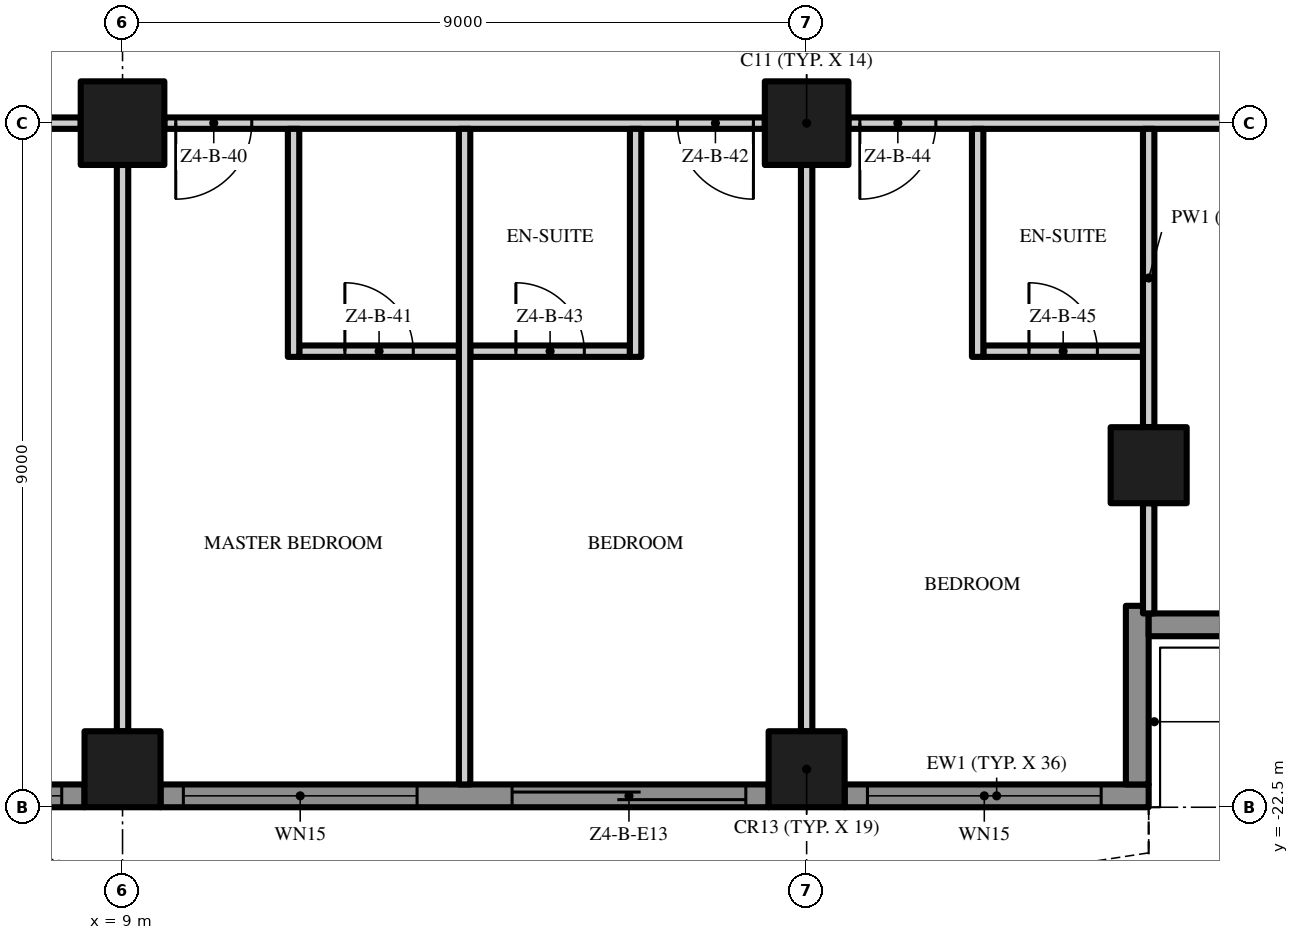
"""IFC4 building model, lengths in metres.
Left out: names, types, materials, properties, quantities, classifications, styles, units other than length and angle.
Written with IfcOpenShell. Run it as: python <this file> out.ifc"""

import sys

from ifc_helpers import new_model, si_unit, direction, frame, frame_2d, origin, origin_2d, place, context, subcontext, project, spatial, polyline, rectangle, outline, extrude, element, fill, save


model = new_model("IFC4")
c1 = context("Model", 3, precision=1e-05, world=origin(), true_north=direction((0.0, 1.0)))
c2 = subcontext(c1, "Body", "Model", "MODEL_VIEW")
j1 = project(units=[si_unit("LENGTHUNIT", "METRE"), si_unit("PLANEANGLEUNIT", "RADIAN")], contexts=[c1])
p1 = place(None, origin())
s1 = spatial("IfcSite", under=j1, at=p1, CompositionType="ELEMENT")
p2 = place(p1, origin())
s2 = spatial("IfcBuilding", under=s1, at=p2, CompositionType="ELEMENT")
p3 = place(p2, frame((0.0, 0.0, 203.4)))
s3 = spatial("IfcBuildingStorey", under=s2, at=p3, CompositionType="ELEMENT", Elevation=203.4)
p4 = place(p3, frame((18.0, -13.5, 0.0), z_axis=(0.0, 0.0, 1.0), x_axis=(1.0, 0.0, 0.0)))
e1 = element("IfcColumn", 1, at=p4, inside=s3, PredefinedType="COLUMN", context=c2, shape_type="SweptSolid", body=[
    extrude(rectangle(XDim=1.1, YDim=1.1, at=origin_2d()), origin(), (0.0, 0.0, 1.0), 3.5),
])
for number, where, z_axis, x_axis in (
    (2, (18.0, -22.0, 0.0), (0.0, 0.0, 1.0), (1.0, 0.0, 0.0)),
    (3, (22.5, -18.0, 0.0), (0.0, 0.0, 1.0), (1.0, 0.0, 0.0)),
):
    element("IfcColumn", number, at=place(p3, frame(where, z_axis=z_axis, x_axis=x_axis)), inside=s3, PredefinedType="COLUMN", context=c2, shape_type="SweptSolid", body=[
        extrude(rectangle(XDim=1.0, YDim=1.0, at=origin_2d()), origin(), (0.0, 0.0, 1.0), 3.5),
    ])
p5 = place(p3, frame((9.0, -13.5, 0.0), z_axis=(0.0, 0.0, 1.0), x_axis=(1.0, 0.0, 0.0)))
e4 = element("IfcColumn", 4, at=p5, inside=s3, PredefinedType="COLUMN", context=c2, shape_type="SweptSolid", body=[
    extrude(rectangle(XDim=1.1, YDim=1.1, at=origin_2d()), origin(), (0.0, 0.0, 1.0), 3.5),
])
p6 = place(p3, frame((9.0, -22.0, 0.0), z_axis=(0.0, 0.0, 1.0), x_axis=(1.0, 0.0, 0.0)))
e5 = element("IfcColumn", 5, at=p6, inside=s3, PredefinedType="COLUMN", context=c2, shape_type="SweptSolid", body=[
    extrude(rectangle(XDim=1.0, YDim=1.0, at=origin_2d()), origin(), (0.0, 0.0, 1.0), 3.5),
])
p7 = place(p3, frame((8.5, -22.35, 0.0), z_axis=(0.0, 0.0, 1.0), x_axis=(-1.0, 0.0, 0.0)))
e6 = element("IfcWall", 6, at=p7, inside=s3, PredefinedType="SOLIDWALL", context=c2, shape_type="SweptSolid", body=[
    extrude(rectangle(XDim=8.0, YDim=0.3, at=frame_2d((4.0, 0.0))), origin(), (0.0, 0.0, 1.0), 3.5),
])
p8 = place(p7, frame((4.625, 0.0, 0.0)))
e7 = element("IfcOpeningElement", 7, at=p8, cuts=e6, PredefinedType="OPENING", context=c2, shape_type="SweptSolid", body=[
    extrude(rectangle(XDim=3.075, YDim=2.4, at=frame_2d((1.538, 1.2))), frame((0.0, 0.16, 0.0), z_axis=(0.0, -1.0, 0.0), x_axis=(1.0, 0.0, 0.0)), (0.0, 0.0, 1.0), 0.32),
])
p9 = place(p7, frame((0.3, 0.0, 0.45)))
e8 = element("IfcOpeningElement", 8, at=p9, cuts=e6, PredefinedType="OPENING", context=c2, shape_type="SweptSolid", body=[
    extrude(rectangle(XDim=3.075, YDim=2.65, at=frame_2d((1.538, 1.325))), frame((0.0, 0.16, 0.0), z_axis=(0.0, -1.0, 0.0), x_axis=(1.0, 0.0, 0.0)), (0.0, 0.0, 1.0), 0.32),
])
p10 = place(p3, frame((17.5, -22.35, 0.0), z_axis=(0.0, 0.0, 1.0), x_axis=(-1.0, 0.0, 0.0)))
e9 = element("IfcWall", 9, at=p10, inside=s3, PredefinedType="SOLIDWALL", context=c2, shape_type="SweptSolid", body=[
    extrude(rectangle(XDim=8.0, YDim=0.3, at=frame_2d((4.0, 0.0))), origin(), (0.0, 0.0, 1.0), 3.5),
])
p11 = place(p10, frame((4.625, 0.0, 0.45)))
e10 = element("IfcOpeningElement", 10, at=p11, cuts=e9, PredefinedType="OPENING", context=c2, shape_type="SweptSolid", body=[
    extrude(rectangle(XDim=3.075, YDim=2.65, at=frame_2d((1.538, 1.325))), frame((0.0, 0.16, 0.0), z_axis=(0.0, -1.0, 0.0), x_axis=(1.0, 0.0, 0.0)), (0.0, 0.0, 1.0), 0.32),
])
p12 = place(p10, frame((0.3, 0.0, 0.0)))
e11 = element("IfcOpeningElement", 11, at=p12, cuts=e9, PredefinedType="OPENING", context=c2, shape_type="SweptSolid", body=[
    extrude(rectangle(XDim=3.075, YDim=2.4, at=frame_2d((1.538, 1.2))), frame((0.0, 0.16, 0.0), z_axis=(0.0, -1.0, 0.0), x_axis=(1.0, 0.0, 0.0)), (0.0, 0.0, 1.0), 0.32),
])
p13 = place(p3, frame((22.5, -22.35, 0.0), z_axis=(0.0, 0.0, 1.0), x_axis=(-1.0, 0.0, 0.0)))
e12 = element("IfcWall", 12, at=p13, inside=s3, PredefinedType="SOLIDWALL", context=c2, shape_type="SweptSolid", body=[
    extrude(rectangle(XDim=4.0, YDim=0.3, at=frame_2d((2.0, 0.0))), origin(), (0.0, 0.0, 1.0), 3.5),
])
p14 = place(p13, frame((0.625, 0.0, 0.45)))
e13 = element("IfcOpeningElement", 13, at=p14, cuts=e12, PredefinedType="OPENING", context=c2, shape_type="SweptSolid", body=[
    extrude(rectangle(XDim=3.075, YDim=2.65, at=frame_2d((1.538, 1.325))), frame((0.0, 0.16, 0.0), z_axis=(0.0, -1.0, 0.0), x_axis=(1.0, 0.0, 0.0)), (0.0, 0.0, 1.0), 0.32),
])
p15 = place(p3, frame((22.35, -19.85, 0.0), z_axis=(0.0, 0.0, 1.0), x_axis=(0.0, -1.0, 0.0)))
e14 = element("IfcWall", 14, at=p15, inside=s3, PredefinedType="SOLIDWALL", context=c2, shape_type="SweptSolid", body=[
    extrude(rectangle(XDim=2.35, YDim=0.3, at=frame_2d((1.175, 0.0))), origin(), (0.0, 0.0, 1.0), 3.5),
])
p16 = place(p3, frame((24.75, -20.1, 0.0), z_axis=(0.0, 0.0, 1.0), x_axis=(-1.0, 0.0, 0.0)))
e15 = element("IfcWall", 15, at=p16, inside=s3, PredefinedType="SOLIDWALL", context=c2, shape_type="SweptSolid", body=[
    extrude(rectangle(XDim=2.25, YDim=0.3, at=frame_2d((1.125, 0.0))), origin(), (0.0, 0.0, 1.0), 3.5),
])
p17 = place(p3, origin())
e16 = element("IfcWall", 16, at=p17, inside=s3, PredefinedType="USERDEFINED", context=c2, shape_type="SweptSolid", body=[
    extrude(outline(polyline([(-22.5, -23.1), (-21.0, -23.329), (-19.5, -23.929), (-18.0, -24.671), (-16.5, -25.271), (-15.0, -25.5), (-13.5, -25.271), (-12.0, -24.671), (-10.5, -23.929), (-9.0, -23.329), (-7.5, -23.1), (-6.0, -23.329), (-4.5, -23.929), (-3.0, -24.671), (-1.5, -25.271), (0.0, -25.5), (1.5, -25.271), (3.0, -24.671), (4.5, -23.929), (6.0, -23.329), (7.5, -23.1), (9.0, -23.329), (10.5, -23.929), (12.0, -24.671), (13.5, -25.271), (15.0, -25.5), (16.5, -25.271), (18.0, -24.671), (19.5, -23.929), (21.0, -23.329), (22.5, -23.1), (22.462, -22.853), (20.934, -23.086), (19.398, -23.701), (17.898, -24.442), (16.434, -25.028), (15.0, -25.247), (13.566, -25.028), (12.102, -24.442), (10.602, -23.701), (9.066, -23.086), (7.5, -22.847), (5.934, -23.086), (4.398, -23.701), (2.898, -24.442), (1.434, -25.028), (0.0, -25.247), (-1.434, -25.028), (-2.898, -24.442), (-4.398, -23.701), (-5.934, -23.086), (-7.5, -22.847), (-9.066, -23.086), (-10.602, -23.701), (-12.102, -24.442), (-13.566, -25.028), (-15.0, -25.247), (-16.434, -25.028), (-17.898, -24.442), (-19.398, -23.701), (-20.934, -23.086), (-22.462, -22.853), (-22.5, -23.1)])), origin(), (0.0, 0.0, 1.0), 0.9),
])
p18 = place(p3, frame((11.325, -16.5, 0.0), z_axis=(0.0, 0.0, 1.0), x_axis=(1.0, 0.0, 0.0)))
e17 = element("IfcWall", 17, at=p18, inside=s3, PredefinedType="PARTITIONING", context=c2, shape_type="SweptSolid", body=[
    extrude(rectangle(XDim=2.1, YDim=0.15, at=frame_2d((1.05, 0.0))), origin(), (0.0, 0.0, 1.0), 3.5),
])
p19 = place(p18, frame((0.6, 0.0, 0.0)))
e18 = element("IfcOpeningElement", 18, at=p19, cuts=e17, PredefinedType="OPENING", context=c2, shape_type="SweptSolid", body=[
    extrude(rectangle(XDim=0.9, YDim=2.1, at=frame_2d((0.45, 1.05))), frame((0.0, 0.085, 0.0), z_axis=(0.0, -1.0, 0.0), x_axis=(1.0, 0.0, 0.0)), (0.0, 0.0, 1.0), 0.17),
])
p20 = place(p3, frame((13.575, -16.5, 0.0), z_axis=(0.0, 0.0, 1.0), x_axis=(1.0, 0.0, 0.0)))
e19 = element("IfcWall", 19, at=p20, inside=s3, PredefinedType="PARTITIONING", context=c2, shape_type="SweptSolid", body=[
    extrude(rectangle(XDim=2.1, YDim=0.15, at=frame_2d((1.05, 0.0))), origin(), (0.0, 0.0, 1.0), 3.5),
])
p21 = place(p20, frame((0.6, 0.0, 0.0)))
e20 = element("IfcOpeningElement", 20, at=p21, cuts=e19, PredefinedType="OPENING", context=c2, shape_type="SweptSolid", body=[
    extrude(rectangle(XDim=0.9, YDim=2.1, at=frame_2d((0.45, 1.05))), frame((0.0, 0.085, 0.0), z_axis=(0.0, -1.0, 0.0), x_axis=(1.0, 0.0, 0.0)), (0.0, 0.0, 1.0), 0.17),
])
p22 = place(p3, frame((20.325, -16.5, 0.0), z_axis=(0.0, 0.0, 1.0), x_axis=(1.0, 0.0, 0.0)))
e21 = element("IfcWall", 21, at=p22, inside=s3, PredefinedType="PARTITIONING", context=c2, shape_type="SweptSolid", body=[
    extrude(rectangle(XDim=2.1, YDim=0.15, at=frame_2d((1.05, 0.0))), origin(), (0.0, 0.0, 1.0), 3.5),
])
p23 = place(p22, frame((0.6, 0.0, 0.0)))
e22 = element("IfcOpeningElement", 22, at=p23, cuts=e21, PredefinedType="OPENING", context=c2, shape_type="SweptSolid", body=[
    extrude(rectangle(XDim=0.9, YDim=2.1, at=frame_2d((0.45, 1.05))), frame((0.0, 0.085, 0.0), z_axis=(0.0, -1.0, 0.0), x_axis=(1.0, 0.0, 0.0)), (0.0, 0.0, 1.0), 0.17),
])
p24 = place(p3, frame((8.45, -13.5, 0.0), z_axis=(0.0, 0.0, 1.0), x_axis=(-1.0, 0.0, 0.0)))
e23 = element("IfcWall", 23, at=p24, inside=s3, PredefinedType="PARTITIONING", context=c2, shape_type="SweptSolid", body=[
    extrude(rectangle(XDim=7.9, YDim=0.15, at=frame_2d((3.95, 0.0))), origin(), (0.0, 0.0, 1.0), 3.5),
])
p25 = place(p24, frame((1.95, 0.0, 0.0)))
e24 = element("IfcOpeningElement", 24, at=p25, cuts=e23, PredefinedType="OPENING", context=c2, shape_type="SweptSolid", body=[
    extrude(rectangle(XDim=1.8, YDim=2.4, at=frame_2d((0.9, 1.2))), frame((0.0, 0.085, 0.0), z_axis=(0.0, -1.0, 0.0), x_axis=(1.0, 0.0, 0.0)), (0.0, 0.0, 1.0), 0.17),
])
p26 = place(p3, frame((17.45, -13.5, 0.0), z_axis=(0.0, 0.0, 1.0), x_axis=(-1.0, 0.0, 0.0)))
e25 = element("IfcWall", 25, at=p26, inside=s3, PredefinedType="PARTITIONING", context=c2, shape_type="SweptSolid", body=[
    extrude(rectangle(XDim=7.9, YDim=0.15, at=frame_2d((3.95, 0.0))), origin(), (0.0, 0.0, 1.0), 3.5),
])
p27 = place(p26, frame((6.75, 0.0, 0.0)))
e26 = element("IfcOpeningElement", 26, at=p27, cuts=e25, PredefinedType="OPENING", context=c2, shape_type="SweptSolid", body=[
    extrude(rectangle(XDim=1.0, YDim=2.4, at=frame_2d((0.5, 1.2))), frame((0.0, 0.085, 0.0), z_axis=(0.0, -1.0, 0.0), x_axis=(1.0, 0.0, 0.0)), (0.0, 0.0, 1.0), 0.17),
])
p28 = place(p26, frame((0.15, 0.0, 0.0)))
e27 = element("IfcOpeningElement", 27, at=p28, cuts=e25, PredefinedType="OPENING", context=c2, shape_type="SweptSolid", body=[
    extrude(rectangle(XDim=1.0, YDim=2.4, at=frame_2d((0.5, 1.2))), frame((0.0, 0.085, 0.0), z_axis=(0.0, -1.0, 0.0), x_axis=(1.0, 0.0, 0.0)), (0.0, 0.0, 1.0), 0.17),
])
p29 = place(p3, frame((26.0, -13.5, 0.0), z_axis=(0.0, 0.0, 1.0), x_axis=(-1.0, 0.0, 0.0)))
e28 = element("IfcWall", 28, at=p29, inside=s3, PredefinedType="PARTITIONING", context=c2, shape_type="SweptSolid", body=[
    extrude(rectangle(XDim=7.45, YDim=0.15, at=frame_2d((3.725, 0.0))), origin(), (0.0, 0.0, 1.0), 3.5),
])
p30 = place(p29, frame((6.3, 0.0, 0.0)))
e29 = element("IfcOpeningElement", 29, at=p30, cuts=e28, PredefinedType="OPENING", context=c2, shape_type="SweptSolid", body=[
    extrude(rectangle(XDim=1.0, YDim=2.4, at=frame_2d((0.5, 1.2))), frame((0.0, 0.085, 0.0), z_axis=(0.0, -1.0, 0.0), x_axis=(1.0, 0.0, 0.0)), (0.0, 0.0, 1.0), 0.17),
])
p31 = place(p29, frame((0.75, 0.0, 0.0)))
e30 = element("IfcOpeningElement", 30, at=p31, cuts=e28, PredefinedType="OPENING", context=c2, shape_type="SweptSolid", body=[
    extrude(rectangle(XDim=1.0, YDim=2.4, at=frame_2d((0.5, 1.2))), frame((0.0, 0.085, 0.0), z_axis=(0.0, -1.0, 0.0), x_axis=(1.0, 0.0, 0.0)), (0.0, 0.0, 1.0), 0.17),
])
p32 = place(p3, frame((9.0, -21.5, 0.0), z_axis=(0.0, 0.0, 1.0), x_axis=(0.0, 1.0, 0.0)))
e31 = element("IfcWall", 31, at=p32, inside=s3, PredefinedType="PARTITIONING", context=c2, shape_type="SweptSolid", body=[
    extrude(rectangle(XDim=7.45, YDim=0.15, at=frame_2d((3.725, 0.0))), origin(), (0.0, 0.0, 1.0), 3.5),
])
p33 = place(p3, frame((11.25, -16.575, 0.0), z_axis=(0.0, 0.0, 1.0), x_axis=(0.0, 1.0, 0.0)))
e32 = element("IfcWall", 32, at=p33, inside=s3, PredefinedType="PARTITIONING", context=c2, shape_type="SweptSolid", body=[
    extrude(rectangle(XDim=3.0, YDim=0.15, at=frame_2d((1.5, 0.0))), origin(), (0.0, 0.0, 1.0), 3.5),
])
p34 = place(p3, frame((13.5, -22.2, 0.0), z_axis=(0.0, 0.0, 1.0), x_axis=(0.0, 1.0, 0.0)))
e33 = element("IfcWall", 33, at=p34, inside=s3, PredefinedType="PARTITIONING", context=c2, shape_type="SweptSolid", body=[
    extrude(rectangle(XDim=8.625, YDim=0.15, at=frame_2d((4.312, 0.0))), origin(), (0.0, 0.0, 1.0), 3.5),
])
p35 = place(p3, frame((15.75, -16.575, 0.0), z_axis=(0.0, 0.0, 1.0), x_axis=(0.0, 1.0, 0.0)))
e34 = element("IfcWall", 34, at=p35, inside=s3, PredefinedType="PARTITIONING", context=c2, shape_type="SweptSolid", body=[
    extrude(rectangle(XDim=3.0, YDim=0.15, at=frame_2d((1.5, 0.0))), origin(), (0.0, 0.0, 1.0), 3.5),
])
p36 = place(p3, frame((18.0, -21.5, 0.0), z_axis=(0.0, 0.0, 1.0), x_axis=(0.0, 1.0, 0.0)))
e35 = element("IfcWall", 35, at=p36, inside=s3, PredefinedType="PARTITIONING", context=c2, shape_type="SweptSolid", body=[
    extrude(rectangle(XDim=7.45, YDim=0.15, at=frame_2d((3.725, 0.0))), origin(), (0.0, 0.0, 1.0), 3.5),
])
p37 = place(p3, frame((20.25, -16.575, 0.0), z_axis=(0.0, 0.0, 1.0), x_axis=(0.0, 1.0, 0.0)))
e36 = element("IfcWall", 36, at=p37, inside=s3, PredefinedType="PARTITIONING", context=c2, shape_type="SweptSolid", body=[
    extrude(rectangle(XDim=3.0, YDim=0.15, at=frame_2d((1.5, 0.0))), origin(), (0.0, 0.0, 1.0), 3.5),
])
p38 = place(p3, frame((22.5, -19.95, 0.0), z_axis=(0.0, 0.0, 1.0), x_axis=(0.0, 1.0, 0.0)))
e37 = element("IfcWall", 37, at=p38, inside=s3, PredefinedType="PARTITIONING", context=c2, shape_type="SweptSolid", body=[
    extrude(rectangle(XDim=1.45, YDim=0.15, at=frame_2d((0.725, 0.0))), origin(), (0.0, 0.0, 1.0), 3.5),
])
p39 = place(p3, frame((22.5, -17.5, 0.0), z_axis=(0.0, 0.0, 1.0), x_axis=(0.0, 1.0, 0.0)))
e38 = element("IfcWall", 38, at=p39, inside=s3, PredefinedType="PARTITIONING", context=c2, shape_type="SweptSolid", body=[
    extrude(rectangle(XDim=3.925, YDim=0.15, at=frame_2d((1.962, 0.0))), origin(), (0.0, 0.0, 1.0), 3.5),
])
p40 = place(p9, origin())
e39 = element("IfcWindow", 39, at=p40, inside=s3, PartitioningType="SINGLE_PANEL", PredefinedType="WINDOW", context=c2, shape_type="SweptSolid", body=[
    extrude(rectangle(XDim=3.075, YDim=2.65, at=frame_2d((1.538, 1.325))), frame((0.0, 0.03, 0.0), z_axis=(0.0, -1.0, 0.0), x_axis=(1.0, 0.0, 0.0)), (0.0, 0.0, 1.0), 0.06),
])
fill(e8, e39)
p41 = place(p11, origin())
e40 = element("IfcWindow", 40, at=p41, inside=s3, PartitioningType="SINGLE_PANEL", PredefinedType="WINDOW", context=c2, shape_type="SweptSolid", body=[
    extrude(rectangle(XDim=3.075, YDim=2.65, at=frame_2d((1.538, 1.325))), frame((0.0, 0.03, 0.0), z_axis=(0.0, -1.0, 0.0), x_axis=(1.0, 0.0, 0.0)), (0.0, 0.0, 1.0), 0.06),
])
fill(e10, e40)
p42 = place(p12, origin())
e41 = element("IfcDoor", 41, at=p42, inside=s3, OperationType="SINGLE_SWING_LEFT", PredefinedType="DOOR", context=c2, shape_type="SweptSolid", body=[
    extrude(rectangle(XDim=3.075, YDim=2.4, at=frame_2d((1.538, 1.2))), frame((0.0, 0.025, 0.0), z_axis=(0.0, -1.0, 0.0), x_axis=(1.0, 0.0, 0.0)), (0.0, 0.0, 1.0), 0.05),
])
fill(e11, e41)
p43 = place(p14, origin())
e42 = element("IfcWindow", 42, at=p43, inside=s3, PartitioningType="SINGLE_PANEL", PredefinedType="WINDOW", context=c2, shape_type="SweptSolid", body=[
    extrude(rectangle(XDim=3.075, YDim=2.65, at=frame_2d((1.538, 1.325))), frame((0.0, 0.03, 0.0), z_axis=(0.0, -1.0, 0.0), x_axis=(1.0, 0.0, 0.0)), (0.0, 0.0, 1.0), 0.06),
])
fill(e13, e42)
p44 = place(p27, origin())
e43 = element("IfcDoor", 43, at=p44, inside=s3, OperationType="SINGLE_SWING_RIGHT", PredefinedType="DOOR", context=c2, shape_type="SweptSolid", body=[
    extrude(rectangle(XDim=1.0, YDim=2.4, at=frame_2d((0.5, 1.2))), frame((0.0, 0.025, 0.0), z_axis=(0.0, -1.0, 0.0), x_axis=(1.0, 0.0, 0.0)), (0.0, 0.0, 1.0), 0.05),
])
fill(e26, e43)
p45 = place(p19, origin())
e44 = element("IfcDoor", 44, at=p45, inside=s3, OperationType="SINGLE_SWING_LEFT", PredefinedType="DOOR", context=c2, shape_type="SweptSolid", body=[
    extrude(rectangle(XDim=0.9, YDim=2.1, at=frame_2d((0.45, 1.05))), frame((0.0, 0.025, 0.0), z_axis=(0.0, -1.0, 0.0), x_axis=(1.0, 0.0, 0.0)), (0.0, 0.0, 1.0), 0.05),
])
fill(e18, e44)
p46 = place(p28, origin())
e45 = element("IfcDoor", 45, at=p46, inside=s3, OperationType="SINGLE_SWING_LEFT", PredefinedType="DOOR", context=c2, shape_type="SweptSolid", body=[
    extrude(rectangle(XDim=1.0, YDim=2.4, at=frame_2d((0.5, 1.2))), frame((0.0, 0.025, 0.0), z_axis=(0.0, -1.0, 0.0), x_axis=(1.0, 0.0, 0.0)), (0.0, 0.0, 1.0), 0.05),
])
fill(e27, e45)
p47 = place(p21, origin())
e46 = element("IfcDoor", 46, at=p47, inside=s3, OperationType="SINGLE_SWING_LEFT", PredefinedType="DOOR", context=c2, shape_type="SweptSolid", body=[
    extrude(rectangle(XDim=0.9, YDim=2.1, at=frame_2d((0.45, 1.05))), frame((0.0, 0.025, 0.0), z_axis=(0.0, -1.0, 0.0), x_axis=(1.0, 0.0, 0.0)), (0.0, 0.0, 1.0), 0.05),
])
fill(e20, e46)
p48 = place(p30, origin())
e47 = element("IfcDoor", 47, at=p48, inside=s3, OperationType="SINGLE_SWING_RIGHT", PredefinedType="DOOR", context=c2, shape_type="SweptSolid", body=[
    extrude(rectangle(XDim=1.0, YDim=2.4, at=frame_2d((0.5, 1.2))), frame((0.0, 0.025, 0.0), z_axis=(0.0, -1.0, 0.0), x_axis=(1.0, 0.0, 0.0)), (0.0, 0.0, 1.0), 0.05),
])
fill(e29, e47)
p49 = place(p23, origin())
e48 = element("IfcDoor", 48, at=p49, inside=s3, OperationType="SINGLE_SWING_LEFT", PredefinedType="DOOR", context=c2, shape_type="SweptSolid", body=[
    extrude(rectangle(XDim=0.9, YDim=2.1, at=frame_2d((0.45, 1.05))), frame((0.0, 0.025, 0.0), z_axis=(0.0, -1.0, 0.0), x_axis=(1.0, 0.0, 0.0)), (0.0, 0.0, 1.0), 0.05),
])
fill(e22, e48)
save(model, sys.argv[1])
